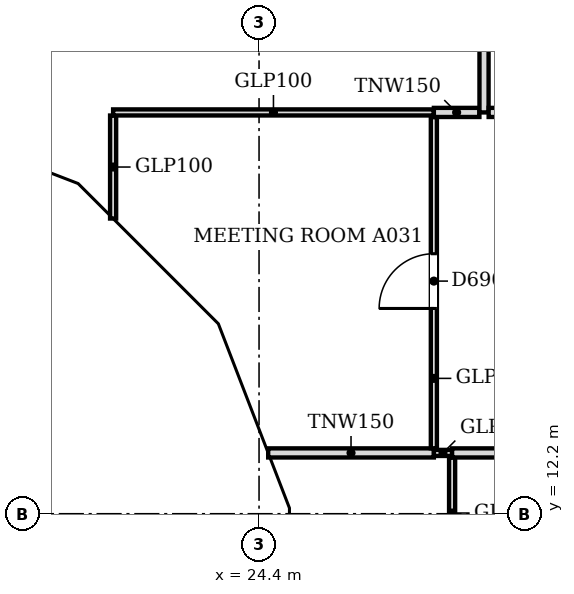
"""IFC4 building model, lengths in metres.
Left out: names, types, materials, properties, quantities, classifications, styles, units other than length and angle.
Written with IfcOpenShell. Run it as: python <this file> out.ifc"""

import sys

from ifc_helpers import new_model, si_unit, direction, frame, frame_2d, origin, place, context, subcontext, project, spatial, polyline, rectangle, outline, extrude, faceted_brep, source, transform, mapped, element, fill, save


model = new_model("IFC4")
c1 = context("Model", 3, precision=1e-05, world=origin(), true_north=direction((0.0, 1.0)))
c2 = subcontext(c1, "Body", "Model", "MODEL_VIEW")
j1 = project(units=[si_unit("LENGTHUNIT", "METRE"), si_unit("PLANEANGLEUNIT", "RADIAN")], contexts=[c1])
p1 = place(None, origin())
s1 = spatial("IfcSite", under=j1, at=p1, CompositionType="ELEMENT")
p2 = place(p1, origin())
s2 = spatial("IfcBuilding", under=s1, at=p2, CompositionType="ELEMENT")
p3 = place(p2, frame((0.0, 0.0, 95.2)))
s3 = spatial("IfcBuildingStorey", under=s2, at=p3, CompositionType="ELEMENT", Elevation=95.2)
m1 = source(origin(), c2, "Body", "Brep", [
    faceted_brep([(3.096, -0.25, 7.536), (0.047, -0.25, 3.856), (0.047, -0.25, 3.744), (3.096, -0.25, 0.064), (0.0, 0.25, 3.8), (3.149, 0.25, 7.6), (3.202, 0.25, 7.536), (3.202, 0.25, 0.064), (3.149, 0.25, 0.0), (3.149, -0.0, 0.0), (3.149, -0.0, 7.6), (0.0, 0.0, 3.8)], [[[0, 1, 2, 3]], [[4, 5, 6, 7, 8]], [[8, 7, 9]], [[6, 5, 10]], [[5, 4, 11, 1, 0, 10]], [[4, 8, 9, 3, 2, 11]], [[11, 2, 1]], [[3, 9, 7, 6, 10, 0]]]),
])
p4 = place(p3, frame((18.346, 18.55, -3.8), z_axis=(0.0, 0.0, 1.0), x_axis=(0.932985567668, -0.359913782069, 0.0)))
e1 = element("IfcWall", 1, at=p4, inside=s3, PredefinedType="SOLIDWALL", context=c2, shape_type="MappedRepresentation", body=[
    mapped(m1, transform((0.0, 0.0, 0.0), scale=1.0)),
])
m2 = source(origin(), c2, "Body", "SweptSolid", [
    extrude(outline(polyline([(2.949, 6.967), (0.325, 3.8), (2.949, 0.633), (2.949, 6.967)])), frame((0.0, 0.26, 0.0), z_axis=(0.0, -1.0, 0.0), x_axis=(1.0, 0.0, 0.0)), (0.0, 0.0, 1.0), 0.52),
])
p5 = place(p4, origin())
e2 = element("IfcOpeningElement", 2, at=p5, cuts=e1, PredefinedType="OPENING", context=c2, shape_type="MappedRepresentation", body=[
    mapped(m2, transform((0.0, 0.0, 0.0), scale=1.0)),
])
m3 = source(origin(), c2, "Body", "Brep", [
    faceted_brep([(0.106, -0.25, 0.064), (3.156, -0.25, 3.736), (3.156, -0.25, 3.864), (0.106, -0.25, 7.536), (0.0, 0.25, 7.536), (0.053, 0.25, 7.6), (3.209, 0.25, 3.8), (0.053, 0.25, 0.0), (0.0, 0.25, 0.064), (3.209, -0.0, 3.8), (0.053, 0.0, 0.0), (0.053, 0.0, 7.6)], [[[0, 1, 2, 3]], [[4, 5, 6, 7, 8]], [[7, 6, 9, 1, 0, 10]], [[6, 5, 11, 3, 2, 9]], [[5, 4, 11]], [[8, 7, 10]], [[8, 10, 0, 3, 11, 4]], [[1, 9, 2]]]),
])
p6 = place(p3, frame((21.248, 17.454, -3.8), z_axis=(0.0, 0.0, 1.0), x_axis=(0.707106781187, -0.707106781187, 0.0)))
e3 = element("IfcWall", 3, at=p6, inside=s3, PredefinedType="SOLIDWALL", context=c2, shape_type="MappedRepresentation", body=[
    mapped(m3, transform((0.0, 0.0, 0.0), scale=1.0)),
])
m4 = source(origin(), c2, "Body", "SweptSolid", [
    extrude(outline(polyline([(0.253, 0.632), (2.884, 3.8), (0.253, 6.968), (0.253, 0.632)])), frame((0.0, 0.26, 0.0), z_axis=(0.0, -1.0, 0.0), x_axis=(1.0, 0.0, 0.0)), (0.0, 0.0, 1.0), 0.52),
])
p7 = place(p6, origin())
e4 = element("IfcOpeningElement", 4, at=p7, cuts=e3, PredefinedType="OPENING", context=c2, shape_type="MappedRepresentation", body=[
    mapped(m4, transform((0.0, 0.0, 0.0), scale=1.0)),
])
m5 = source(origin(), c2, "Body", "Brep", [
    faceted_brep([(3.103, -0.25, 7.544), (0.053, -0.25, 3.864), (0.053, -0.25, 3.736), (3.103, -0.25, 0.056), (0.0, 0.25, 3.8), (3.149, 0.25, 7.6), (3.196, 0.25, 7.543), (3.196, 0.25, 0.057), (3.149, 0.25, 0.0), (3.149, -0.0, 0.0), (3.149, -0.0, 7.6), (0.0, 0.0, 3.8)], [[[0, 1, 2, 3]], [[4, 5, 6, 7, 8]], [[8, 7, 9]], [[6, 5, 10]], [[5, 4, 11, 1, 0, 10]], [[4, 8, 9, 3, 2, 11]], [[11, 2, 1]], [[3, 9, 7, 6, 10, 0]]]),
])
p8 = place(p3, frame((23.517, 15.185, -3.8), z_axis=(0.0, 0.0, 1.0), x_axis=(0.359864468756, -0.933004589553, 0.0)))
e5 = element("IfcWall", 5, at=p8, inside=s3, PredefinedType="SOLIDWALL", context=c2, shape_type="MappedRepresentation", body=[
    mapped(m5, transform((0.0, 0.0, 0.0), scale=1.0)),
])
p9 = place(p8, origin())
e6 = element("IfcOpeningElement", 6, at=p9, cuts=e5, PredefinedType="OPENING", context=c2, shape_type="MappedRepresentation", body=[
    mapped(m2, transform((0.0, 0.0, 0.0), scale=1.0)),
])
m6 = source(origin(), c2, "Body", "Brep", [
    faceted_brep([(0.093, -0.25, 0.057), (3.143, -0.25, 3.8), (0.093, -0.25, 7.543), (0.0, 0.25, 7.544), (0.047, 0.25, 7.6), (3.143, 0.25, 3.8), (0.047, 0.25, 0.0), (0.0, 0.25, 0.056), (0.047, 0.0, 0.0), (0.047, 0.0, 7.6)], [[[0, 1, 2]], [[3, 4, 5, 6, 7]], [[6, 5, 1, 0, 8]], [[5, 4, 9, 2, 1]], [[4, 3, 9]], [[7, 6, 8]], [[7, 8, 0, 2, 9, 3]]]),
])
p10 = place(p3, frame((24.65, 12.293, -3.8), z_axis=(0.0, 0.0, 1.0), x_axis=(0.0, -1.0, 0.0)))
e7 = element("IfcWall", 7, at=p10, inside=s3, PredefinedType="SOLIDWALL", context=c2, shape_type="MappedRepresentation", body=[
    mapped(m6, transform((0.0, 0.0, 0.0), scale=1.0)),
])
m7 = source(origin(), c2, "Body", "SweptSolid", [
    extrude(outline(polyline([(0.247, 0.641), (2.821, 3.8), (0.247, 6.959), (0.247, 0.641)])), frame((0.0, 0.26, 0.0), z_axis=(0.0, -1.0, 0.0), x_axis=(1.0, 0.0, 0.0)), (0.0, 0.0, 1.0), 0.52),
])
p11 = place(p10, origin())
e8 = element("IfcOpeningElement", 8, at=p11, cuts=e7, PredefinedType="OPENING", context=c2, shape_type="MappedRepresentation", body=[
    mapped(m7, transform((0.0, 0.0, 0.0), scale=1.0)),
])
p12 = place(p2, frame((0.0, 0.0, 99.0)))
s4 = spatial("IfcBuildingStorey", under=s2, at=p12, CompositionType="ELEMENT", Elevation=99.0)
m8 = source(origin(), c2, "Body", "Brep", [
    faceted_brep([(0.093, -0.25, 0.056), (3.143, -0.25, 3.736), (3.143, -0.25, 3.864), (0.093, -0.25, 7.544), (0.0, 0.25, 7.543), (0.047, 0.25, 7.6), (3.196, 0.25, 3.8), (0.047, 0.25, 0.0), (0.0, 0.25, 0.057), (3.196, -0.0, 3.8), (0.047, 0.0, 0.0), (0.047, 0.0, 7.6)], [[[0, 1, 2, 3]], [[4, 5, 6, 7, 8]], [[7, 6, 9, 1, 0, 10]], [[6, 5, 11, 3, 2, 9]], [[5, 4, 11]], [[8, 7, 10]], [[8, 10, 0, 3, 11, 4]], [[1, 9, 2]]]),
])
p13 = place(p12, frame((18.303, 18.567, -3.8), z_axis=(0.0, 0.0, 1.0), x_axis=(0.932978940178, -0.359930961693, 0.0)))
e9 = element("IfcWall", 9, at=p13, inside=s4, PredefinedType="SOLIDWALL", context=c2, shape_type="MappedRepresentation", body=[
    mapped(m8, transform((0.0, 0.0, 0.0), scale=1.0)),
])
m9 = source(origin(), c2, "Body", "SweptSolid", [
    extrude(outline(polyline([(0.247, 0.633), (2.871, 3.8), (0.247, 6.967), (0.247, 0.633)])), frame((0.0, 0.26, 0.0), z_axis=(0.0, -1.0, 0.0), x_axis=(1.0, 0.0, 0.0)), (0.0, 0.0, 1.0), 0.52),
])
p14 = place(p13, origin())
e10 = element("IfcOpeningElement", 10, at=p14, cuts=e9, PredefinedType="OPENING", context=c2, shape_type="MappedRepresentation", body=[
    mapped(m9, transform((0.0, 0.0, 0.0), scale=1.0)),
])
m10 = source(origin(), c2, "Body", "Brep", [
    faceted_brep([(3.103, -0.25, 7.536), (0.053, -0.25, 3.864), (0.053, -0.25, 3.736), (3.103, -0.25, 0.064), (0.0, 0.25, 3.8), (3.156, 0.25, 7.6), (3.209, 0.25, 7.536), (3.209, 0.25, 0.064), (3.156, 0.25, 0.0), (3.156, -0.0, 0.0), (3.156, -0.0, 7.6), (0.0, 0.0, 3.8)], [[[0, 1, 2, 3]], [[4, 5, 6, 7, 8]], [[8, 7, 9]], [[6, 5, 10]], [[5, 4, 11, 1, 0, 10]], [[4, 8, 9, 3, 2, 11]], [[11, 2, 1]], [[3, 9, 7, 6, 10, 0]]]),
])
p15 = place(p12, frame((21.285, 17.417, -3.8), z_axis=(0.0, 0.0, 1.0), x_axis=(0.707106781187, -0.707106781187, 0.0)))
e11 = element("IfcWall", 11, at=p15, inside=s4, PredefinedType="SOLIDWALL", context=c2, shape_type="MappedRepresentation", body=[
    mapped(m10, transform((0.0, 0.0, 0.0), scale=1.0)),
])
m11 = source(origin(), c2, "Body", "SweptSolid", [
    extrude(outline(polyline([(2.956, 6.968), (0.325, 3.8), (2.956, 0.632), (2.956, 6.968)])), frame((0.0, 0.26, 0.0), z_axis=(0.0, -1.0, 0.0), x_axis=(1.0, 0.0, 0.0)), (0.0, 0.0, 1.0), 0.52),
])
p16 = place(p15, origin())
e12 = element("IfcOpeningElement", 12, at=p16, cuts=e11, PredefinedType="OPENING", context=c2, shape_type="MappedRepresentation", body=[
    mapped(m11, transform((0.0, 0.0, 0.0), scale=1.0)),
])
m12 = source(origin(), c2, "Body", "Brep", [
    faceted_brep([(0.106, -0.25, 0.064), (3.156, -0.25, 3.744), (3.156, -0.25, 3.856), (0.106, -0.25, 7.536), (0.0, 0.25, 7.536), (0.053, 0.25, 7.6), (3.202, 0.25, 3.8), (0.053, 0.25, 0.0), (0.0, 0.25, 0.064), (3.202, -0.0, 3.8), (0.053, 0.0, 0.0), (0.053, 0.0, 7.6)], [[[0, 1, 2, 3]], [[4, 5, 6, 7, 8]], [[7, 6, 9, 1, 0, 10]], [[6, 5, 11, 3, 2, 9]], [[5, 4, 11]], [[8, 7, 10]], [[8, 10, 0, 3, 11, 4]], [[1, 9, 2]]]),
])
p17 = place(p12, frame((23.497, 15.234, -3.8), z_axis=(0.0, 0.0, 1.0), x_axis=(0.359913782069, -0.932985567668, 0.0)))
e13 = element("IfcWall", 13, at=p17, inside=s4, PredefinedType="SOLIDWALL", context=c2, shape_type="MappedRepresentation", body=[
    mapped(m12, transform((0.0, 0.0, 0.0), scale=1.0)),
])
m13 = source(origin(), c2, "Body", "SweptSolid", [
    extrude(outline(polyline([(0.253, 0.633), (2.878, 3.8), (0.253, 6.967), (0.253, 0.633)])), frame((0.0, 0.26, 0.0), z_axis=(0.0, -1.0, 0.0), x_axis=(1.0, 0.0, 0.0)), (0.0, 0.0, 1.0), 0.52),
])
p18 = place(p17, origin())
e14 = element("IfcOpeningElement", 14, at=p18, cuts=e13, PredefinedType="OPENING", context=c2, shape_type="MappedRepresentation", body=[
    mapped(m13, transform((0.0, 0.0, 0.0), scale=1.0)),
])
m14 = source(origin(), c2, "Body", "Brep", [
    faceted_brep([(3.096, -0.25, 0.0), (6.1, -0.25, 3.8), (3.096, -0.25, 7.6), (0.047, -0.25, 3.857), (0.047, -0.25, 3.743), (0.0, 0.25, 3.8), (3.096, 0.25, 7.6), (6.053, 0.25, 3.859), (6.053, 0.25, 3.741), (3.096, 0.25, 0.0), (6.1, -0.0, 3.8), (0.0, 0.0, 3.8)], [[[0, 1, 2, 3, 4]], [[5, 6, 7, 8, 9]], [[9, 8, 10, 1, 0]], [[7, 6, 2, 1, 10]], [[6, 5, 11, 3, 2]], [[5, 9, 0, 4, 11]], [[11, 4, 3]], [[10, 8, 7]]]),
])
p19 = place(p12, frame((24.65, 12.247, -3.8), z_axis=(0.0, 0.0, 1.0), x_axis=(0.0, -1.0, 0.0)))
e15 = element("IfcWall", 15, at=p19, inside=s4, PredefinedType="SOLIDWALL", context=c2, shape_type="MappedRepresentation", body=[
    mapped(m14, transform((0.0, 0.0, 0.0), scale=1.0)),
])
m15 = source(origin(), c2, "Body", "SweptSolid", [
    extrude(outline(polyline([(3.094, 0.399), (5.781, 3.8), (3.094, 7.201), (0.323, 3.8), (3.094, 0.399)])), frame((0.0, 0.26, 0.0), z_axis=(0.0, -1.0, 0.0), x_axis=(1.0, 0.0, 0.0)), (0.0, 0.0, 1.0), 0.52),
])
p20 = place(p19, origin())
e16 = element("IfcOpeningElement", 16, at=p20, cuts=e15, PredefinedType="OPENING", context=c2, shape_type="MappedRepresentation", body=[
    mapped(m15, transform((0.0, 0.0, 0.0), scale=1.0)),
])
p21 = place(p3, frame((27.575, 8.599, 0.0), z_axis=(0.0, 0.0, 1.0), x_axis=(0.0, 1.0, 0.0)))
e17 = element("IfcWall", 17, at=p21, inside=s3, PredefinedType="PARTITIONING", context=c2, shape_type="SweptSolid", body=[
    extrude(rectangle(XDim=4.525, YDim=0.1, at=frame_2d((2.263, 0.0))), origin(), (0.0, 0.0, 1.0), 3.067),
])
m16 = source(origin(), c2, "Body", "SweptSolid", [
    extrude(rectangle(XDim=0.9, YDim=2.1, at=frame_2d((0.45, 1.05))), frame((0.0, 0.06, 0.0), z_axis=(0.0, -1.0, 0.0), x_axis=(1.0, 0.0, 0.0)), (0.0, 0.0, 1.0), 0.12),
])
p22 = place(p21, frame((1.8, 0.0, 0.0)))
e18 = element("IfcOpeningElement", 18, at=p22, cuts=e17, PredefinedType="OPENING", context=c2, shape_type="MappedRepresentation", body=[
    mapped(m16, transform((0.0, 0.0, 0.0), scale=1.0)),
])
p23 = place(p3, frame((24.55, 13.2, 0.0), z_axis=(0.0, 0.0, 1.0), x_axis=(1.0, 0.0, 0.0)))
e19 = element("IfcWall", 19, at=p23, inside=s3, PredefinedType="PARTITIONING", context=c2, shape_type="SweptSolid", body=[
    extrude(rectangle(XDim=2.725, YDim=0.15, at=frame_2d((1.362, 0.0))), origin(), (0.0, 0.0, 1.0), 3.067),
])
p24 = place(p3, frame((27.276, 13.2, 0.0), z_axis=(0.0, 0.0, 1.0), x_axis=(1.0, 0.0, 0.0)))
e20 = element("IfcWall", 20, at=p24, inside=s3, PredefinedType="PARTITIONING", context=c2, shape_type="SweptSolid", body=[
    extrude(rectangle(XDim=0.298, YDim=0.1, at=frame_2d((0.149, 0.0))), origin(), (0.0, 0.0, 1.0), 3.067),
])
p25 = place(p3, frame((27.575, 13.2, 0.0), z_axis=(0.0, 0.0, 1.0), x_axis=(1.0, 0.0, 0.0)))
e21 = element("IfcWall", 21, at=p25, inside=s3, PredefinedType="PARTITIONING", context=c2, shape_type="SweptSolid", body=[
    extrude(rectangle(XDim=15.349, YDim=0.15, at=frame_2d((7.675, 0.0))), origin(), (0.0, 0.0, 1.0), 3.067),
])
p26 = place(p3, frame((27.275, 13.276, 0.0), z_axis=(0.0, 0.0, 1.0), x_axis=(0.0, 1.0, 0.0)))
e22 = element("IfcWall", 22, at=p26, inside=s3, PredefinedType="PARTITIONING", context=c2, shape_type="SweptSolid", body=[
    extrude(rectangle(XDim=5.448, YDim=0.1, at=frame_2d((2.724, 0.0))), origin(), (0.0, 0.0, 1.0), 3.067),
])
p27 = place(p26, frame((2.3, 0.0, 0.0)))
e23 = element("IfcOpeningElement", 23, at=p27, cuts=e22, PredefinedType="OPENING", context=c2, shape_type="MappedRepresentation", body=[
    mapped(m16, transform((0.0, 0.0, 0.0), scale=1.0)),
])
p28 = place(p3, frame((22.0, 17.055, 0.0), z_axis=(0.0, 0.0, 1.0), x_axis=(0.0, 1.0, 0.0)))
e24 = element("IfcWall", 24, at=p28, inside=s3, PredefinedType="PARTITIONING", context=c2, shape_type="SweptSolid", body=[
    extrude(rectangle(XDim=1.694, YDim=0.1, at=frame_2d((0.847, 0.0))), origin(), (0.0, 0.0, 1.0), 3.067),
])
p29 = place(p3, frame((22.0, 18.8, 0.0), z_axis=(0.0, 0.0, 1.0), x_axis=(1.0, 0.0, 0.0)))
e25 = element("IfcWall", 25, at=p29, inside=s3, PredefinedType="PARTITIONING", context=c2, shape_type="SweptSolid", body=[
    extrude(rectangle(XDim=5.274, YDim=0.1, at=frame_2d((2.637, 0.0))), origin(), (0.0, 0.0, 1.0), 3.067),
])
p30 = place(p3, frame((27.275, 18.8, 0.0), z_axis=(0.0, 0.0, 1.0), x_axis=(1.0, 0.0, 0.0)))
e26 = element("IfcWall", 26, at=p30, inside=s3, PredefinedType="PARTITIONING", context=c2, shape_type="SweptSolid", body=[
    extrude(rectangle(XDim=0.749, YDim=0.15, at=frame_2d((0.375, 0.0))), origin(), (0.0, 0.0, 1.0), 3.067),
])
p31 = place(p3, frame((28.1, 18.8, 0.0), z_axis=(0.0, 0.0, 1.0), x_axis=(0.0, 1.0, 0.0)))
e27 = element("IfcWall", 27, at=p31, inside=s3, PredefinedType="PARTITIONING", context=c2, shape_type="SweptSolid", body=[
    extrude(rectangle(XDim=26.424, YDim=0.15, at=frame_2d((13.212, 0.0))), origin(), (0.0, 0.0, 1.0), 3.067),
])
m17 = source(origin(), c2, "Body", "SweptSolid", [
    extrude(rectangle(XDim=0.9, YDim=2.1, at=frame_2d((0.45, 1.05))), frame((0.0, 0.085, 0.0), z_axis=(0.0, -1.0, 0.0), x_axis=(1.0, 0.0, 0.0)), (0.0, 0.0, 1.0), 0.17),
])
p32 = place(p31, frame((1.1, 0.0, 0.0)))
e28 = element("IfcOpeningElement", 28, at=p32, cuts=e27, PredefinedType="OPENING", context=c2, shape_type="MappedRepresentation", body=[
    mapped(m17, transform((0.0, 0.0, 0.0), scale=1.0)),
])
p33 = place(p31, frame((23.151, 0.0, 0.0)))
e29 = element("IfcOpeningElement", 29, at=p33, cuts=e27, PredefinedType="OPENING", context=c2, shape_type="MappedRepresentation", body=[
    mapped(m17, transform((0.0, 0.0, 0.0), scale=1.0)),
])
m18 = source(origin(), c2, "Body", "SweptSolid", [
    extrude(rectangle(XDim=1.0, YDim=2.1, at=frame_2d((0.5, 1.05))), frame((0.0, 0.085, 0.0), z_axis=(0.0, -1.0, 0.0), x_axis=(1.0, 0.0, 0.0)), (0.0, 0.0, 1.0), 0.17),
])
p34 = place(p31, frame((17.251, 0.0, 0.0)))
e30 = element("IfcOpeningElement", 30, at=p34, cuts=e27, PredefinedType="OPENING", context=c2, shape_type="MappedRepresentation", body=[
    mapped(m18, transform((0.0, 0.0, 0.0), scale=1.0)),
])
p35 = place(p31, frame((9.7, 0.0, 0.0)))
e31 = element("IfcOpeningElement", 31, at=p35, cuts=e27, PredefinedType="OPENING", context=c2, shape_type="MappedRepresentation", body=[
    mapped(m17, transform((0.0, 0.0, 0.0), scale=1.0)),
])
p36 = place(p3, frame((28.176, 18.8, 0.0), z_axis=(0.0, 0.0, 1.0), x_axis=(1.0, 0.0, 0.0)))
e32 = element("IfcWall", 32, at=p36, inside=s3, PredefinedType="PARTITIONING", context=c2, shape_type="SweptSolid", body=[
    extrude(rectangle(XDim=2.248, YDim=0.15, at=frame_2d((1.124, 0.0))), origin(), (0.0, 0.0, 1.0), 3.067),
])
m19 = source(origin(), c2, "Body", "SweptSolid", [
    extrude(rectangle(XDim=0.9, YDim=2.1, at=frame_2d((0.45, 1.05))), frame((0.0, 0.025, 0.0), z_axis=(0.0, -1.0, 0.0), x_axis=(1.0, 0.0, 0.0)), (0.0, 0.0, 1.0), 0.05),
])
p37 = place(p27, origin())
e33 = element("IfcDoor", 33, at=p37, inside=s3, OperationType="SINGLE_SWING_LEFT", PredefinedType="DOOR", context=c2, shape_type="MappedRepresentation", body=[
    mapped(m19, transform((0.0, 0.0, 0.0), scale=1.0)),
])
fill(e23, e33)
save(model, sys.argv[1])
